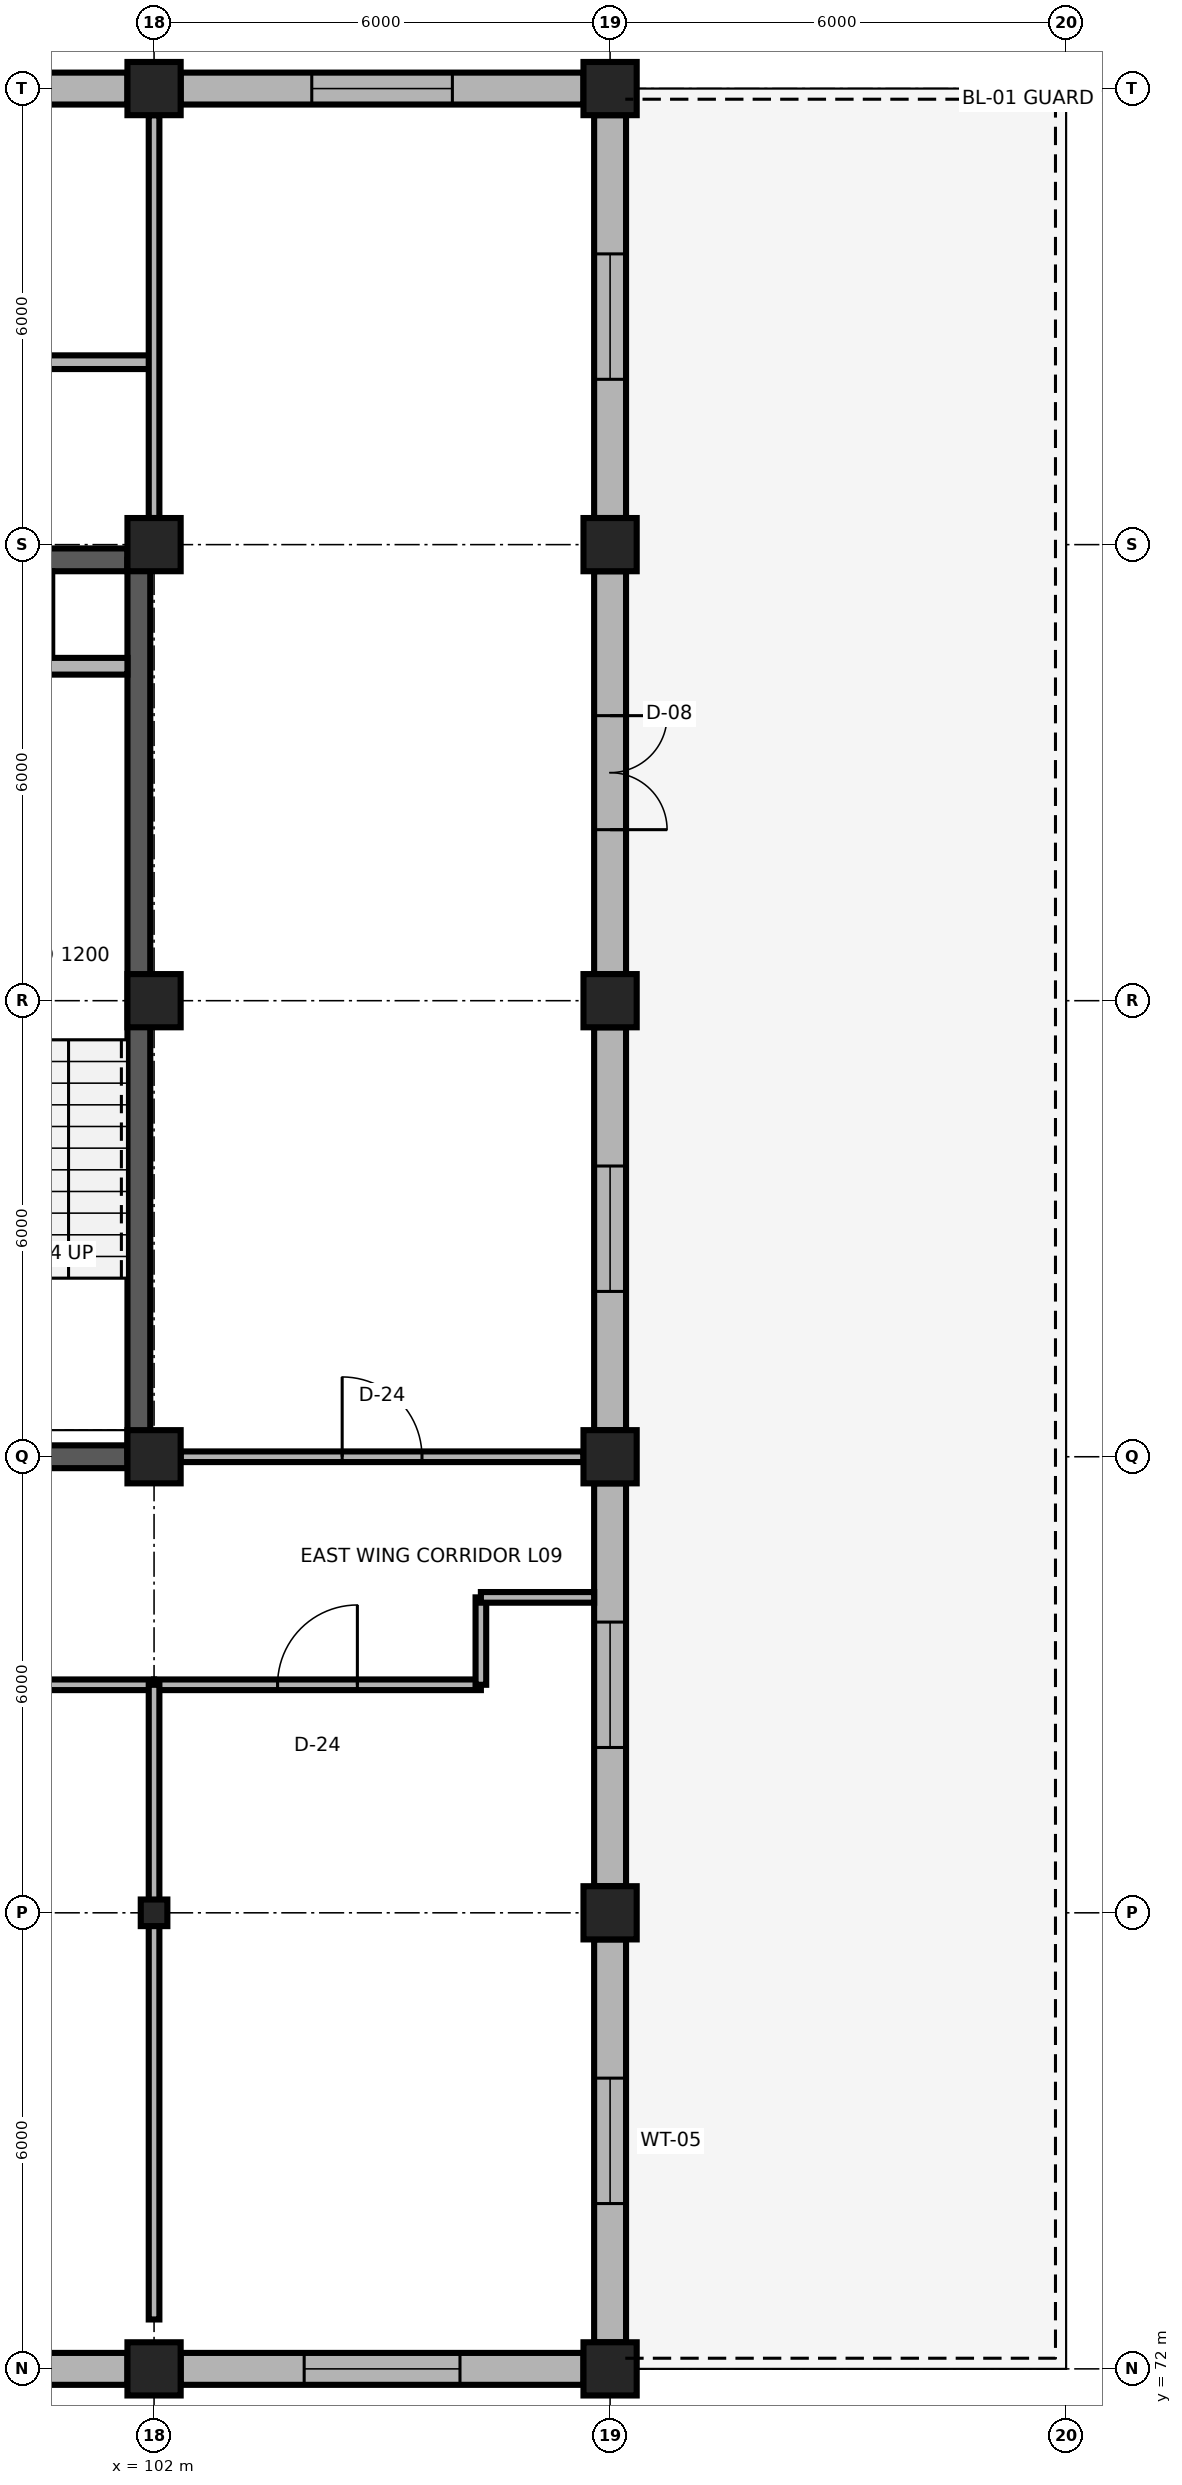
"""IFC4 building model, lengths in metres.
Left out: names, types, materials, properties, quantities, classifications, styles, units other than length and angle.
Written with IfcOpenShell. Run it as: python <this file> out.ifc"""

import sys

from ifc_helpers import new_model, si_unit, direction, frame, frame_2d, origin, origin_2d, place, context, subcontext, project, spatial, rectangle, i_section, extrude, element, fill, save


model = new_model("IFC4")
c1 = context("Model", 3, precision=1e-05, world=origin(), true_north=direction((0.0, 1.0)))
c2 = subcontext(c1, "Body", "Model", "MODEL_VIEW")
j1 = project(units=[si_unit("LENGTHUNIT", "METRE"), si_unit("PLANEANGLEUNIT", "RADIAN")], contexts=[c1])
p1 = place(None, origin())
s1 = spatial("IfcSite", under=j1, at=p1, CompositionType="ELEMENT")
p2 = place(p1, origin())
s2 = spatial("IfcBuilding", under=s1, at=p2, CompositionType="ELEMENT")
p3 = place(p2, frame((0.0, 0.0, 36.6)))
s3 = spatial("IfcBuildingStorey", under=s2, at=p3, CompositionType="ELEMENT", Elevation=36.6)
for number, where, z_axis, x_axis in (
    (1, (102.0, 72.0, 0.0), (0.0, 0.0, 1.0), (1.0, 0.0, 0.0)),
    (2, (108.0, 72.0, 0.0), (0.0, 0.0, 1.0), (1.0, 0.0, 0.0)),
):
    element("IfcColumn", number, at=place(p3, frame(where, z_axis=z_axis, x_axis=x_axis)), inside=s3, PredefinedType="COLUMN", context=c2, shape_type="SweptSolid", body=[
        extrude(rectangle(XDim=0.7, YDim=0.7, at=origin_2d()), origin(), (0.0, 0.0, 1.0), 3.9),
    ])
p4 = place(p3, frame((102.0, 78.0, 0.0), z_axis=(0.0, 0.0, 1.0), x_axis=(1.0, 0.0, 0.0)))
e3 = element("IfcColumn", 3, at=p4, inside=s3, PredefinedType="COLUMN", context=c2, shape_type="SweptSolid", body=[
    extrude(i_section(OverallWidth=0.35, OverallDepth=0.35, WebThickness=0.012, FlangeThickness=0.019, FilletRadius=0.02, at=origin_2d()), origin(), (0.0, 0.0, 1.0), 3.9),
])
for number, where, z_axis, x_axis in (
    (4, (108.0, 78.0, 0.0), (0.0, 0.0, 1.0), (1.0, 0.0, 0.0)),
    (5, (102.0, 84.0, 0.0), (0.0, 0.0, 1.0), (1.0, 0.0, 0.0)),
    (6, (108.0, 84.0, 0.0), (0.0, 0.0, 1.0), (1.0, 0.0, 0.0)),
    (7, (102.0, 90.0, 0.0), (0.0, 0.0, 1.0), (1.0, 0.0, 0.0)),
    (8, (108.0, 90.0, 0.0), (0.0, 0.0, 1.0), (1.0, 0.0, 0.0)),
    (9, (102.0, 96.0, 0.0), (0.0, 0.0, 1.0), (1.0, 0.0, 0.0)),
    (10, (108.0, 96.0, 0.0), (0.0, 0.0, 1.0), (1.0, 0.0, 0.0)),
    (11, (102.0, 102.0, 0.0), (0.0, 0.0, 1.0), (1.0, 0.0, 0.0)),
    (12, (108.0, 102.0, 0.0), (0.0, 0.0, 1.0), (1.0, 0.0, 0.0)),
):
    element("IfcColumn", number, at=place(p3, frame(where, z_axis=z_axis, x_axis=x_axis)), inside=s3, PredefinedType="COLUMN", context=c2, shape_type="SweptSolid", body=[
        extrude(rectangle(XDim=0.7, YDim=0.7, at=origin_2d()), origin(), (0.0, 0.0, 1.0), 3.9),
    ])
p5 = place(p3, frame((96.35, 72.0, 0.0), z_axis=(0.0, 0.0, 1.0), x_axis=(1.0, 0.0, 0.0)))
e13 = element("IfcWall", 13, at=p5, inside=s3, PredefinedType="SOLIDWALL", context=c2, shape_type="SweptSolid", body=[
    extrude(rectangle(XDim=5.3, YDim=0.42, at=frame_2d((2.65, 0.0))), origin(), (0.0, 0.0, 1.0), 3.32),
])
p6 = place(p5, frame((1.625, 0.0, 0.85)))
e14 = element("IfcOpeningElement", 14, at=p6, cuts=e13, PredefinedType="OPENING", context=c2, shape_type="SweptSolid", body=[
    extrude(rectangle(XDim=2.05, YDim=2.0, at=frame_2d((1.025, 1.0))), frame((0.0, 0.225, 0.0), z_axis=(0.0, -1.0, 0.0), x_axis=(1.0, 0.0, 0.0)), (0.0, 0.0, 1.0), 0.45),
])
p7 = place(p3, frame((102.35, 72.0, 0.0), z_axis=(0.0, 0.0, 1.0), x_axis=(1.0, 0.0, 0.0)))
e15 = element("IfcWall", 15, at=p7, inside=s3, PredefinedType="SOLIDWALL", context=c2, shape_type="SweptSolid", body=[
    extrude(rectangle(XDim=5.3, YDim=0.42, at=frame_2d((2.65, 0.0))), origin(), (0.0, 0.0, 1.0), 3.32),
])
p8 = place(p7, frame((1.625, 0.0, 0.85)))
e16 = element("IfcOpeningElement", 16, at=p8, cuts=e15, PredefinedType="OPENING", context=c2, shape_type="SweptSolid", body=[
    extrude(rectangle(XDim=2.05, YDim=2.0, at=frame_2d((1.025, 1.0))), frame((0.0, 0.225, 0.0), z_axis=(0.0, -1.0, 0.0), x_axis=(1.0, 0.0, 0.0)), (0.0, 0.0, 1.0), 0.45),
])
p9 = place(p3, frame((96.35, 102.0, 0.0), z_axis=(0.0, 0.0, 1.0), x_axis=(1.0, 0.0, 0.0)))
e17 = element("IfcWall", 17, at=p9, inside=s3, PredefinedType="SOLIDWALL", context=c2, shape_type="SweptSolid", body=[
    extrude(rectangle(XDim=5.3, YDim=0.42, at=frame_2d((2.65, 0.0))), origin(), (0.0, 0.0, 1.0), 3.32),
])
p10 = place(p9, frame((1.725, 0.0, 0.85)))
e18 = element("IfcOpeningElement", 18, at=p10, cuts=e17, PredefinedType="OPENING", context=c2, shape_type="SweptSolid", body=[
    extrude(rectangle(XDim=1.85, YDim=2.0, at=frame_2d((0.925, 1.0))), frame((0.0, 0.225, 0.0), z_axis=(0.0, -1.0, 0.0), x_axis=(1.0, 0.0, 0.0)), (0.0, 0.0, 1.0), 0.45),
])
p11 = place(p3, frame((102.35, 102.0, 0.0), z_axis=(0.0, 0.0, 1.0), x_axis=(1.0, 0.0, 0.0)))
e19 = element("IfcWall", 19, at=p11, inside=s3, PredefinedType="SOLIDWALL", context=c2, shape_type="SweptSolid", body=[
    extrude(rectangle(XDim=5.3, YDim=0.42, at=frame_2d((2.65, 0.0))), origin(), (0.0, 0.0, 1.0), 3.32),
])
p12 = place(p11, frame((1.725, 0.0, 0.85)))
e20 = element("IfcOpeningElement", 20, at=p12, cuts=e19, PredefinedType="OPENING", context=c2, shape_type="SweptSolid", body=[
    extrude(rectangle(XDim=1.85, YDim=2.0, at=frame_2d((0.925, 1.0))), frame((0.0, 0.225, 0.0), z_axis=(0.0, -1.0, 0.0), x_axis=(1.0, 0.0, 0.0)), (0.0, 0.0, 1.0), 0.45),
])
p13 = place(p3, frame((108.0, 72.35, 0.0), z_axis=(0.0, 0.0, 1.0), x_axis=(0.0, 1.0, 0.0)))
e21 = element("IfcWall", 21, at=p13, inside=s3, PredefinedType="SOLIDWALL", context=c2, shape_type="SweptSolid", body=[
    extrude(rectangle(XDim=5.3, YDim=0.42, at=frame_2d((2.65, 0.0))), origin(), (0.0, 0.0, 1.0), 3.32),
])
p14 = place(p13, frame((1.825, 0.0, 0.85)))
e22 = element("IfcOpeningElement", 22, at=p14, cuts=e21, PredefinedType="OPENING", context=c2, shape_type="SweptSolid", body=[
    extrude(rectangle(XDim=1.65, YDim=1.95, at=frame_2d((0.825, 0.975))), frame((0.0, 0.225, 0.0), z_axis=(0.0, -1.0, 0.0), x_axis=(1.0, 0.0, 0.0)), (0.0, 0.0, 1.0), 0.45),
])
p15 = place(p3, frame((108.0, 78.35, 0.0), z_axis=(0.0, 0.0, 1.0), x_axis=(0.0, 1.0, 0.0)))
e23 = element("IfcWall", 23, at=p15, inside=s3, PredefinedType="SOLIDWALL", context=c2, shape_type="SweptSolid", body=[
    extrude(rectangle(XDim=5.3, YDim=0.42, at=frame_2d((2.65, 0.0))), origin(), (0.0, 0.0, 1.0), 3.32),
])
p16 = place(p15, frame((1.825, 0.0, 0.85)))
e24 = element("IfcOpeningElement", 24, at=p16, cuts=e23, PredefinedType="OPENING", context=c2, shape_type="SweptSolid", body=[
    extrude(rectangle(XDim=1.65, YDim=1.95, at=frame_2d((0.825, 0.975))), frame((0.0, 0.225, 0.0), z_axis=(0.0, -1.0, 0.0), x_axis=(1.0, 0.0, 0.0)), (0.0, 0.0, 1.0), 0.45),
])
p17 = place(p3, frame((108.0, 84.35, 0.0), z_axis=(0.0, 0.0, 1.0), x_axis=(0.0, 1.0, 0.0)))
e25 = element("IfcWall", 25, at=p17, inside=s3, PredefinedType="SOLIDWALL", context=c2, shape_type="SweptSolid", body=[
    extrude(rectangle(XDim=5.3, YDim=0.42, at=frame_2d((2.65, 0.0))), origin(), (0.0, 0.0, 1.0), 3.32),
])
p18 = place(p17, frame((1.825, 0.0, 0.85)))
e26 = element("IfcOpeningElement", 26, at=p18, cuts=e25, PredefinedType="OPENING", context=c2, shape_type="SweptSolid", body=[
    extrude(rectangle(XDim=1.65, YDim=1.95, at=frame_2d((0.825, 0.975))), frame((0.0, 0.225, 0.0), z_axis=(0.0, -1.0, 0.0), x_axis=(1.0, 0.0, 0.0)), (0.0, 0.0, 1.0), 0.45),
])
p19 = place(p3, frame((108.0, 90.35, 0.0), z_axis=(0.0, 0.0, 1.0), x_axis=(0.0, 1.0, 0.0)))
e27 = element("IfcWall", 27, at=p19, inside=s3, PredefinedType="SOLIDWALL", context=c2, shape_type="SweptSolid", body=[
    extrude(rectangle(XDim=5.3, YDim=0.42, at=frame_2d((2.65, 0.0))), origin(), (0.0, 0.0, 1.0), 3.32),
])
p20 = place(p19, frame((1.9, 0.0, 0.0)))
e28 = element("IfcOpeningElement", 28, at=p20, cuts=e27, PredefinedType="OPENING", context=c2, shape_type="SweptSolid", body=[
    extrude(rectangle(XDim=1.5, YDim=2.3, at=frame_2d((0.75, 1.15))), frame((0.0, 0.225, 0.0), z_axis=(0.0, -1.0, 0.0), x_axis=(1.0, 0.0, 0.0)), (0.0, 0.0, 1.0), 0.45),
])
p21 = place(p3, frame((108.0, 96.35, 0.0), z_axis=(0.0, 0.0, 1.0), x_axis=(0.0, 1.0, 0.0)))
e29 = element("IfcWall", 29, at=p21, inside=s3, PredefinedType="SOLIDWALL", context=c2, shape_type="SweptSolid", body=[
    extrude(rectangle(XDim=5.3, YDim=0.42, at=frame_2d((2.65, 0.0))), origin(), (0.0, 0.0, 1.0), 3.32),
])
p22 = place(p21, frame((1.825, 0.0, 0.85)))
e30 = element("IfcOpeningElement", 30, at=p22, cuts=e29, PredefinedType="OPENING", context=c2, shape_type="SweptSolid", body=[
    extrude(rectangle(XDim=1.65, YDim=1.95, at=frame_2d((0.825, 0.975))), frame((0.0, 0.225, 0.0), z_axis=(0.0, -1.0, 0.0), x_axis=(1.0, 0.0, 0.0)), (0.0, 0.0, 1.0), 0.45),
])
p23 = place(p3, frame((96.35, 84.0, 0.0), z_axis=(0.0, 0.0, 1.0), x_axis=(1.0, 0.0, 0.0)))
e31 = element("IfcWall", 31, at=p23, inside=s3, PredefinedType="SHEAR", context=c2, shape_type="SweptSolid", body=[
    extrude(rectangle(XDim=5.3, YDim=0.3, at=frame_2d((2.65, 0.0))), origin(), (0.0, 0.0, 1.0), 3.66),
])
p24 = place(p23, frame((1.975, 0.0, 0.0)))
e32 = element("IfcOpeningElement", 32, at=p24, cuts=e31, PredefinedType="OPENING", context=c2, shape_type="SweptSolid", body=[
    extrude(rectangle(XDim=1.35, YDim=2.2, at=frame_2d((0.675, 1.1))), frame((0.0, 0.165, 0.0), z_axis=(0.0, -1.0, 0.0), x_axis=(1.0, 0.0, 0.0)), (0.0, 0.0, 1.0), 0.33),
])
p25 = place(p3, frame((96.35, 95.8, 0.0), z_axis=(0.0, 0.0, 1.0), x_axis=(1.0, 0.0, 0.0)))
e33 = element("IfcWall", 33, at=p25, inside=s3, PredefinedType="SHEAR", context=c2, shape_type="SweptSolid", body=[
    extrude(rectangle(XDim=5.3, YDim=0.3, at=frame_2d((2.65, 0.0))), origin(), (0.0, 0.0, 1.0), 3.74),
])
p26 = place(p3, frame((101.8, 84.0, 0.0), z_axis=(0.0, 0.0, 1.0), x_axis=(0.0, 1.0, 0.0)))
e34 = element("IfcWall", 34, at=p26, inside=s3, PredefinedType="SHEAR", context=c2, shape_type="SweptSolid", body=[
    extrude(rectangle(XDim=11.8, YDim=0.3, at=frame_2d((5.9, 0.0))), origin(), (0.0, 0.0, 1.0), 3.74),
])
p27 = place(p3, frame((100.55, 94.4, 0.0), z_axis=(0.0, 0.0, 1.0), x_axis=(0.0, 1.0, 0.0)))
e35 = element("IfcWall", 35, at=p27, inside=s3, PredefinedType="PARTITIONING", context=c2, shape_type="SweptSolid", body=[
    extrude(rectangle(XDim=1.25, YDim=0.22, at=frame_2d((0.625, 0.0))), origin(), (0.0, 0.0, 1.0), 3.74),
])
p28 = place(p3, frame((100.55, 94.4, 0.0), z_axis=(0.0, 0.0, 1.0), x_axis=(1.0, 0.0, 0.0)))
e36 = element("IfcWall", 36, at=p28, inside=s3, PredefinedType="PARTITIONING", context=c2, shape_type="SweptSolid", body=[
    extrude(rectangle(XDim=1.1, YDim=0.22, at=frame_2d((0.55, 0.0))), origin(), (0.0, 0.0, 1.0), 3.74),
])
p29 = place(p3, frame((96.0, 81.0, 0.0), z_axis=(0.0, 0.0, 1.0), x_axis=(1.0, 0.0, 0.0)))
e37 = element("IfcWall", 37, at=p29, inside=s3, PredefinedType="PARTITIONING", context=c2, shape_type="SweptSolid", body=[
    extrude(rectangle(XDim=6.0, YDim=0.14, at=frame_2d((3.0, 0.0))), origin(), (0.0, 0.0, 1.0), 3.74),
])
p30 = place(p29, frame((2.475, 0.0, 0.0)))
e38 = element("IfcOpeningElement", 38, at=p30, cuts=e37, PredefinedType="OPENING", context=c2, shape_type="SweptSolid", body=[
    extrude(rectangle(XDim=1.05, YDim=2.25, at=frame_2d((0.525, 1.125))), frame((0.0, 0.085, 0.0), z_axis=(0.0, -1.0, 0.0), x_axis=(1.0, 0.0, 0.0)), (0.0, 0.0, 1.0), 0.17),
])
p31 = place(p3, frame((102.0, 81.0, 0.0), z_axis=(0.0, 0.0, 1.0), x_axis=(1.0, 0.0, 0.0)))
e39 = element("IfcWall", 39, at=p31, inside=s3, PredefinedType="PARTITIONING", context=c2, shape_type="SweptSolid", body=[
    extrude(rectangle(XDim=4.3, YDim=0.14, at=frame_2d((2.15, 0.0))), origin(), (0.0, 0.0, 1.0), 3.74),
])
p32 = place(p31, frame((1.625, 0.0, 0.0)))
e40 = element("IfcOpeningElement", 40, at=p32, cuts=e39, PredefinedType="OPENING", context=c2, shape_type="SweptSolid", body=[
    extrude(rectangle(XDim=1.05, YDim=2.25, at=frame_2d((0.525, 1.125))), frame((0.0, 0.085, 0.0), z_axis=(0.0, -1.0, 0.0), x_axis=(1.0, 0.0, 0.0)), (0.0, 0.0, 1.0), 0.17),
])
p33 = place(p3, frame((102.35, 84.0, 0.0), z_axis=(0.0, 0.0, 1.0), x_axis=(1.0, 0.0, 0.0)))
e41 = element("IfcWall", 41, at=p33, inside=s3, PredefinedType="PARTITIONING", context=c2, shape_type="SweptSolid", body=[
    extrude(rectangle(XDim=5.3, YDim=0.14, at=frame_2d((2.65, 0.0))), origin(), (0.0, 0.0, 1.0), 3.348),
])
p34 = place(p33, frame((2.125, 0.0, 0.0)))
e42 = element("IfcOpeningElement", 42, at=p34, cuts=e41, PredefinedType="OPENING", context=c2, shape_type="SweptSolid", body=[
    extrude(rectangle(XDim=1.05, YDim=2.25, at=frame_2d((0.525, 1.125))), frame((0.0, 0.085, 0.0), z_axis=(0.0, -1.0, 0.0), x_axis=(1.0, 0.0, 0.0)), (0.0, 0.0, 1.0), 0.17),
])
p35 = place(p3, frame((102.0, 72.65, 0.0), z_axis=(0.0, 0.0, 1.0), x_axis=(0.0, 1.0, 0.0)))
e43 = element("IfcWall", 43, at=p35, inside=s3, PredefinedType="PARTITIONING", context=c2, shape_type="SweptSolid", body=[
    extrude(rectangle(XDim=8.35, YDim=0.14, at=frame_2d((4.175, 0.0))), origin(), (0.0, 0.0, 1.0), 3.348),
])
p36 = place(p3, frame((106.3, 81.0, 0.0), z_axis=(0.0, 0.0, 1.0), x_axis=(0.0, 1.0, 0.0)))
e44 = element("IfcWall", 44, at=p36, inside=s3, PredefinedType="PARTITIONING", context=c2, shape_type="SweptSolid", body=[
    extrude(rectangle(XDim=1.15, YDim=0.14, at=frame_2d((0.575, 0.0))), origin(), (0.0, 0.0, 1.0), 3.74),
])
p37 = place(p3, frame((106.3, 82.15, 0.0), z_axis=(0.0, 0.0, 1.0), x_axis=(1.0, 0.0, 0.0)))
e45 = element("IfcWall", 45, at=p37, inside=s3, PredefinedType="PARTITIONING", context=c2, shape_type="SweptSolid", body=[
    extrude(rectangle(XDim=1.49, YDim=0.14, at=frame_2d((0.745, 0.0))), origin(), (0.0, 0.0, 1.0), 3.74),
])
p38 = place(p3, frame((90.0, 98.4, 0.0), z_axis=(0.0, 0.0, 1.0), x_axis=(1.0, 0.0, 0.0)))
e46 = element("IfcWall", 46, at=p38, inside=s3, PredefinedType="PARTITIONING", context=c2, shape_type="SweptSolid", body=[
    extrude(rectangle(XDim=12.0, YDim=0.18, at=frame_2d((6.0, 0.0))), origin(), (0.0, 0.0, 1.0), 3.74),
])
p39 = place(p3, frame((102.0, 96.35, 0.0), z_axis=(0.0, 0.0, 1.0), x_axis=(0.0, 1.0, 0.0)))
e47 = element("IfcWall", 47, at=p39, inside=s3, PredefinedType="PARTITIONING", context=c2, shape_type="SweptSolid", body=[
    extrude(rectangle(XDim=5.3, YDim=0.14, at=frame_2d((2.65, 0.0))), origin(), (0.0, 0.0, 1.0), 3.348),
])
p40 = place(p8, origin())
e48 = element("IfcWindow", 48, at=p40, inside=s3, PartitioningType="SINGLE_PANEL", PredefinedType="WINDOW", context=c2, shape_type="SweptSolid", body=[
    extrude(rectangle(XDim=2.05, YDim=2.0, at=frame_2d((1.025, 1.0))), frame((0.0, 0.03, 0.0), z_axis=(0.0, -1.0, 0.0), x_axis=(1.0, 0.0, 0.0)), (0.0, 0.0, 1.0), 0.06),
])
fill(e16, e48)
p41 = place(p12, origin())
e49 = element("IfcWindow", 49, at=p41, inside=s3, PartitioningType="SINGLE_PANEL", PredefinedType="WINDOW", context=c2, shape_type="SweptSolid", body=[
    extrude(rectangle(XDim=1.85, YDim=2.0, at=frame_2d((0.925, 1.0))), frame((0.0, 0.03, 0.0), z_axis=(0.0, -1.0, 0.0), x_axis=(1.0, 0.0, 0.0)), (0.0, 0.0, 1.0), 0.06),
])
fill(e20, e49)
p42 = place(p14, origin())
e50 = element("IfcWindow", 50, at=p42, inside=s3, PartitioningType="SINGLE_PANEL", PredefinedType="WINDOW", context=c2, shape_type="SweptSolid", body=[
    extrude(rectangle(XDim=1.65, YDim=1.95, at=frame_2d((0.825, 0.975))), frame((0.0, 0.03, 0.0), z_axis=(0.0, -1.0, 0.0), x_axis=(1.0, 0.0, 0.0)), (0.0, 0.0, 1.0), 0.06),
])
fill(e22, e50)
p43 = place(p16, origin())
e51 = element("IfcWindow", 51, at=p43, inside=s3, PartitioningType="SINGLE_PANEL", PredefinedType="WINDOW", context=c2, shape_type="SweptSolid", body=[
    extrude(rectangle(XDim=1.65, YDim=1.95, at=frame_2d((0.825, 0.975))), frame((0.0, 0.03, 0.0), z_axis=(0.0, -1.0, 0.0), x_axis=(1.0, 0.0, 0.0)), (0.0, 0.0, 1.0), 0.06),
])
fill(e24, e51)
p44 = place(p18, origin())
e52 = element("IfcWindow", 52, at=p44, inside=s3, PartitioningType="SINGLE_PANEL", PredefinedType="WINDOW", context=c2, shape_type="SweptSolid", body=[
    extrude(rectangle(XDim=1.65, YDim=1.95, at=frame_2d((0.825, 0.975))), frame((0.0, 0.03, 0.0), z_axis=(0.0, -1.0, 0.0), x_axis=(1.0, 0.0, 0.0)), (0.0, 0.0, 1.0), 0.06),
])
fill(e26, e52)
p45 = place(p20, origin())
e53 = element("IfcDoor", 53, at=p45, inside=s3, OperationType="DOUBLE_DOOR_SINGLE_SWING", PredefinedType="DOOR", context=c2, shape_type="SweptSolid", body=[
    extrude(rectangle(XDim=1.5, YDim=2.3, at=frame_2d((0.75, 1.15))), frame((0.0, 0.025, 0.0), z_axis=(0.0, -1.0, 0.0), x_axis=(1.0, 0.0, 0.0)), (0.0, 0.0, 1.0), 0.05),
])
fill(e28, e53)
p46 = place(p22, origin())
e54 = element("IfcWindow", 54, at=p46, inside=s3, PartitioningType="SINGLE_PANEL", PredefinedType="WINDOW", context=c2, shape_type="SweptSolid", body=[
    extrude(rectangle(XDim=1.65, YDim=1.95, at=frame_2d((0.825, 0.975))), frame((0.0, 0.03, 0.0), z_axis=(0.0, -1.0, 0.0), x_axis=(1.0, 0.0, 0.0)), (0.0, 0.0, 1.0), 0.06),
])
fill(e30, e54)
p47 = place(p32, origin())
e55 = element("IfcDoor", 55, at=p47, inside=s3, OperationType="SINGLE_SWING_RIGHT", PredefinedType="DOOR", context=c2, shape_type="SweptSolid", body=[
    extrude(rectangle(XDim=1.05, YDim=2.25, at=frame_2d((0.525, 1.125))), frame((0.0, 0.025, 0.0), z_axis=(0.0, -1.0, 0.0), x_axis=(1.0, 0.0, 0.0)), (0.0, 0.0, 1.0), 0.05),
])
fill(e40, e55)
p48 = place(p34, origin())
e56 = element("IfcDoor", 56, at=p48, inside=s3, OperationType="SINGLE_SWING_LEFT", PredefinedType="DOOR", context=c2, shape_type="SweptSolid", body=[
    extrude(rectangle(XDim=1.05, YDim=2.25, at=frame_2d((0.525, 1.125))), frame((0.0, 0.025, 0.0), z_axis=(0.0, -1.0, 0.0), x_axis=(1.0, 0.0, 0.0)), (0.0, 0.0, 1.0), 0.05),
])
fill(e42, e56)
save(model, sys.argv[1])
